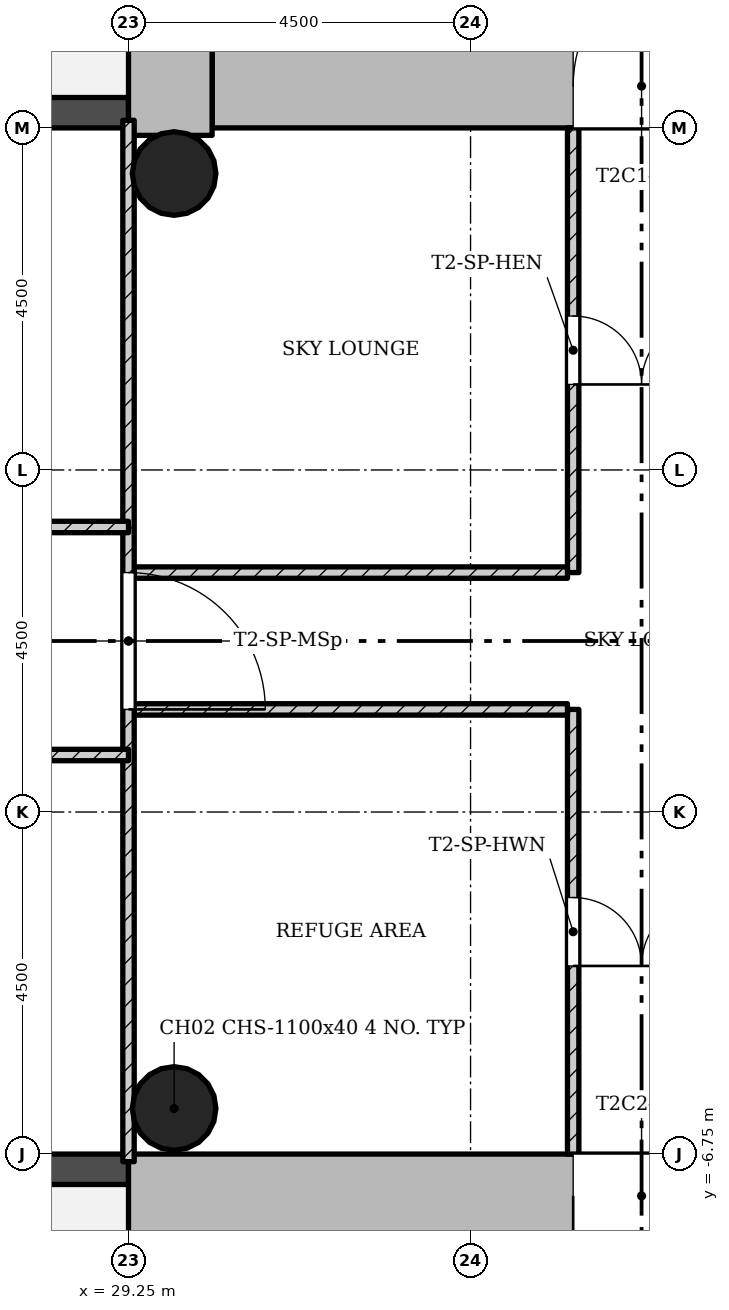
"""IFC4 building model, lengths in metres.
Left out: names, types, materials, properties, quantities, classifications, styles, units other than length and angle.
Written with IfcOpenShell. Run it as: python <this file> out.ifc"""

import sys

from ifc_helpers import new_model, si_unit, direction, frame, frame_2d, origin, origin_2d, place, context, subcontext, project, spatial, rectangle, hollow_circle, extrude, element, fill, save


model = new_model("IFC4")
c1 = context("Model", 3, precision=1e-05, world=origin(), true_north=direction((0.0, 1.0)))
c2 = subcontext(c1, "Body", "Model", "MODEL_VIEW")
j1 = project(units=[si_unit("LENGTHUNIT", "METRE"), si_unit("PLANEANGLEUNIT", "RADIAN")], contexts=[c1])
p1 = place(None, origin())
s1 = spatial("IfcSite", under=j1, at=p1, CompositionType="ELEMENT")
p2 = place(p1, origin())
s2 = spatial("IfcBuilding", under=s1, at=p2, CompositionType="ELEMENT")
p3 = place(p2, frame((0.0, 0.0, 72.1)))
s3 = spatial("IfcBuildingStorey", under=s2, at=p3, CompositionType="ELEMENT", Elevation=72.1)
p4 = place(p3, frame((30.35, 7.3, 0.0), z_axis=(0.0, 0.0, 1.0), x_axis=(1.0, 0.0, 0.0)))
e1 = element("IfcWall", 1, at=p4, inside=s3, PredefinedType="SHEAR", context=c2, shape_type="SweptSolid", body=[
    extrude(rectangle(XDim=12.4, YDim=1.1, at=frame_2d((6.2, 0.0))), origin(), (0.0, 0.0, 1.0), 4.5),
])
p5 = place(p4, frame((4.75, 0.0, 0.0)))
e2 = element("IfcOpeningElement", 2, at=p5, cuts=e1, PredefinedType="OPENING", context=c2, shape_type="SweptSolid", body=[
    extrude(rectangle(XDim=1.8, YDim=2.1, at=frame_2d((0.9, 1.05))), frame((0.0, 0.56, 0.0), z_axis=(0.0, -1.0, 0.0), x_axis=(1.0, 0.0, 0.0)), (0.0, 0.0, 1.0), 1.12),
])
p6 = place(p3, frame((29.8, 15.248, 0.0), z_axis=(0.0, 0.0, 1.0), x_axis=(0.0, -1.0, 0.0)))
e3 = element("IfcWall", 3, at=p6, inside=s3, PredefinedType="SHEAR", context=c2, shape_type="SweptSolid", body=[
    extrude(rectangle(XDim=8.596, YDim=1.1, at=frame_2d((4.298, 0.0))), origin(), (0.0, 0.0, 1.0), 4.5),
])
p7 = place(p3, frame((41.65, -7.3, 0.0), z_axis=(0.0, 0.0, 1.0), x_axis=(-1.0, 0.0, 0.0)))
e4 = element("IfcWall", 4, at=p7, inside=s3, PredefinedType="SHEAR", context=c2, shape_type="SweptSolid", body=[
    extrude(rectangle(XDim=12.4, YDim=1.1, at=frame_2d((6.2, 0.0))), origin(), (0.0, 0.0, 1.0), 4.5),
])
p8 = place(p7, frame((4.75, 0.0, 0.0)))
e5 = element("IfcOpeningElement", 5, at=p8, cuts=e4, PredefinedType="OPENING", context=c2, shape_type="SweptSolid", body=[
    extrude(rectangle(XDim=1.8, YDim=2.1, at=frame_2d((0.9, 1.05))), frame((0.0, 0.56, 0.0), z_axis=(0.0, -1.0, 0.0), x_axis=(1.0, 0.0, 0.0)), (0.0, 0.0, 1.0), 1.12),
])
for number, where, z_axis, x_axis in (
    (6, (29.85, 6.15, 0.0), (0.0, 0.0, 1.0), (1.0, 0.0, 0.0)),
    (7, (29.85, -6.15, 0.0), (0.0, 0.0, 1.0), (1.0, 0.0, 0.0)),
):
    element("IfcColumn", number, at=place(p3, frame(where, z_axis=z_axis, x_axis=x_axis)), inside=s3, PredefinedType="COLUMN", context=c2, shape_type="SweptSolid", body=[
        extrude(hollow_circle(Radius=0.55, WallThickness=0.04, at=origin_2d()), origin(), (0.0, 0.0, 1.0), 4.5),
    ])
p9 = place(p3, frame((29.25, 6.95, -0.02), z_axis=(0.0, 0.0, 1.0), x_axis=(-1.0, 0.0, 0.0)))
e8 = element("IfcWall", 8, at=p9, inside=s3, PredefinedType="STANDARD", context=c2, shape_type="SweptSolid", body=[
    extrude(rectangle(XDim=4.5, YDim=0.4, at=frame_2d((2.25, 0.0))), origin(), (0.0, 0.0, 1.0), 4.22),
])
p10 = place(p9, frame((1.35, 0.0, 0.02)))
e9 = element("IfcOpeningElement", 9, at=p10, cuts=e8, PredefinedType="OPENING", context=c2, shape_type="SweptSolid", body=[
    extrude(rectangle(XDim=1.8, YDim=2.1, at=frame_2d((0.9, 1.05))), frame((0.0, 0.21, 0.0), z_axis=(0.0, -1.0, 0.0), x_axis=(1.0, 0.0, 0.0)), (0.0, 0.0, 1.0), 0.42),
])
p11 = place(p3, frame((24.75, -6.95, -0.02), z_axis=(0.0, 0.0, 1.0), x_axis=(1.0, 0.0, 0.0)))
e10 = element("IfcWall", 10, at=p11, inside=s3, PredefinedType="STANDARD", context=c2, shape_type="SweptSolid", body=[
    extrude(rectangle(XDim=4.5, YDim=0.4, at=frame_2d((2.25, 0.0))), origin(), (0.0, 0.0, 1.0), 4.22),
])
p12 = place(p11, frame((1.35, 0.0, 0.02)))
e11 = element("IfcOpeningElement", 11, at=p12, cuts=e10, PredefinedType="OPENING", context=c2, shape_type="SweptSolid", body=[
    extrude(rectangle(XDim=1.8, YDim=2.1, at=frame_2d((0.9, 1.05))), frame((0.0, 0.21, 0.0), z_axis=(0.0, -1.0, 0.0), x_axis=(1.0, 0.0, 0.0)), (0.0, 0.0, 1.0), 0.42),
])
p13 = place(p3, frame((35.1, 0.9, 0.0), z_axis=(0.0, 0.0, 1.0), x_axis=(0.0, 1.0, 0.0)))
e12 = element("IfcWall", 12, at=p13, inside=s3, PredefinedType="PARTITIONING", context=c2, shape_type="SweptSolid", body=[
    extrude(rectangle(XDim=5.85, YDim=0.15, at=frame_2d((2.925, 0.0))), origin(), (0.0, 0.0, 1.0), 4.08),
])
p14 = place(p13, frame((2.475, 0.0, 0.0)))
e13 = element("IfcOpeningElement", 13, at=p14, cuts=e12, PredefinedType="OPENING", context=c2, shape_type="SweptSolid", body=[
    extrude(rectangle(XDim=0.9, YDim=2.1, at=frame_2d((0.45, 1.05))), frame((0.0, 0.085, 0.0), z_axis=(0.0, -1.0, 0.0), x_axis=(1.0, 0.0, 0.0)), (0.0, 0.0, 1.0), 0.17),
])
p15 = place(p3, frame((35.025, 0.9, 0.0), z_axis=(0.0, 0.0, 1.0), x_axis=(-1.0, 0.0, 0.0)))
e14 = element("IfcWall", 14, at=p15, inside=s3, PredefinedType="PARTITIONING", context=c2, shape_type="SweptSolid", body=[
    extrude(rectangle(XDim=5.7, YDim=0.15, at=frame_2d((2.85, 0.0))), origin(), (0.0, 0.0, 1.0), 4.08),
])
p16 = place(p3, frame((35.1, -6.75, 0.0), z_axis=(0.0, 0.0, 1.0), x_axis=(0.0, 1.0, 0.0)))
e15 = element("IfcWall", 15, at=p16, inside=s3, PredefinedType="PARTITIONING", context=c2, shape_type="SweptSolid", body=[
    extrude(rectangle(XDim=5.85, YDim=0.15, at=frame_2d((2.925, 0.0))), origin(), (0.0, 0.0, 1.0), 4.08),
])
p17 = place(p16, frame((2.475, 0.0, 0.0)))
e16 = element("IfcOpeningElement", 16, at=p17, cuts=e15, PredefinedType="OPENING", context=c2, shape_type="SweptSolid", body=[
    extrude(rectangle(XDim=0.9, YDim=2.1, at=frame_2d((0.45, 1.05))), frame((0.0, 0.085, 0.0), z_axis=(0.0, -1.0, 0.0), x_axis=(1.0, 0.0, 0.0)), (0.0, 0.0, 1.0), 0.17),
])
p18 = place(p3, frame((35.025, -0.9, 0.0), z_axis=(0.0, 0.0, 1.0), x_axis=(-1.0, 0.0, 0.0)))
e17 = element("IfcWall", 17, at=p18, inside=s3, PredefinedType="PARTITIONING", context=c2, shape_type="SweptSolid", body=[
    extrude(rectangle(XDim=5.7, YDim=0.15, at=frame_2d((2.85, 0.0))), origin(), (0.0, 0.0, 1.0), 4.08),
])
p19 = place(p3, frame((29.25, -6.85, 0.0), z_axis=(0.0, 0.0, 1.0), x_axis=(0.0, 1.0, 0.0)))
e18 = element("IfcWall", 18, at=p19, inside=s3, PredefinedType="PARTITIONING", context=c2, shape_type="SweptSolid", body=[
    extrude(rectangle(XDim=13.7, YDim=0.15, at=frame_2d((6.85, 0.0))), origin(), (0.0, 0.0, 1.0), 4.08),
])
p20 = place(p19, frame((5.95, 0.0, 0.0)))
e19 = element("IfcOpeningElement", 19, at=p20, cuts=e18, PredefinedType="OPENING", context=c2, shape_type="SweptSolid", body=[
    extrude(rectangle(XDim=1.8, YDim=2.1, at=frame_2d((0.9, 1.05))), frame((0.0, 0.085, 0.0), z_axis=(0.0, -1.0, 0.0), x_axis=(1.0, 0.0, 0.0)), (0.0, 0.0, 1.0), 0.17),
])
p21 = place(p3, frame((29.25, 1.5, 0.0), z_axis=(0.0, 0.0, 1.0), x_axis=(-1.0, 0.0, 0.0)))
e20 = element("IfcWall", 20, at=p21, inside=s3, PredefinedType="PARTITIONING", context=c2, shape_type="SweptSolid", body=[
    extrude(rectangle(XDim=13.6, YDim=0.15, at=frame_2d((6.8, 0.0))), origin(), (0.0, 0.0, 1.0), 4.08),
])
p22 = place(p21, frame((1.8, 0.0, 0.0)))
e21 = element("IfcOpeningElement", 21, at=p22, cuts=e20, PredefinedType="OPENING", context=c2, shape_type="SweptSolid", body=[
    extrude(rectangle(XDim=0.9, YDim=2.1, at=frame_2d((0.45, 1.05))), frame((0.0, 0.085, 0.0), z_axis=(0.0, -1.0, 0.0), x_axis=(1.0, 0.0, 0.0)), (0.0, 0.0, 1.0), 0.17),
])
p23 = place(p21, frame((6.3, 0.0, 0.0)))
e22 = element("IfcOpeningElement", 22, at=p23, cuts=e20, PredefinedType="OPENING", context=c2, shape_type="SweptSolid", body=[
    extrude(rectangle(XDim=0.9, YDim=2.1, at=frame_2d((0.45, 1.05))), frame((0.0, 0.085, 0.0), z_axis=(0.0, -1.0, 0.0), x_axis=(1.0, 0.0, 0.0)), (0.0, 0.0, 1.0), 0.17),
])
p24 = place(p21, frame((10.8, 0.0, 0.0)))
e23 = element("IfcOpeningElement", 23, at=p24, cuts=e20, PredefinedType="OPENING", context=c2, shape_type="SweptSolid", body=[
    extrude(rectangle(XDim=0.9, YDim=2.1, at=frame_2d((0.45, 1.05))), frame((0.0, 0.085, 0.0), z_axis=(0.0, -1.0, 0.0), x_axis=(1.0, 0.0, 0.0)), (0.0, 0.0, 1.0), 0.17),
])
p25 = place(p3, frame((29.25, -1.5, 0.0), z_axis=(0.0, 0.0, 1.0), x_axis=(-1.0, 0.0, 0.0)))
e24 = element("IfcWall", 24, at=p25, inside=s3, PredefinedType="PARTITIONING", context=c2, shape_type="SweptSolid", body=[
    extrude(rectangle(XDim=13.6, YDim=0.15, at=frame_2d((6.8, 0.0))), origin(), (0.0, 0.0, 1.0), 4.08),
])
p26 = place(p25, frame((1.8, 0.0, 0.0)))
e25 = element("IfcOpeningElement", 25, at=p26, cuts=e24, PredefinedType="OPENING", context=c2, shape_type="SweptSolid", body=[
    extrude(rectangle(XDim=0.9, YDim=2.1, at=frame_2d((0.45, 1.05))), frame((0.0, 0.085, 0.0), z_axis=(0.0, -1.0, 0.0), x_axis=(1.0, 0.0, 0.0)), (0.0, 0.0, 1.0), 0.17),
])
p27 = place(p25, frame((6.3, 0.0, 0.0)))
e26 = element("IfcOpeningElement", 26, at=p27, cuts=e24, PredefinedType="OPENING", context=c2, shape_type="SweptSolid", body=[
    extrude(rectangle(XDim=0.9, YDim=2.1, at=frame_2d((0.45, 1.05))), frame((0.0, 0.085, 0.0), z_axis=(0.0, -1.0, 0.0), x_axis=(1.0, 0.0, 0.0)), (0.0, 0.0, 1.0), 0.17),
])
p28 = place(p25, frame((10.8, 0.0, 0.0)))
e27 = element("IfcOpeningElement", 27, at=p28, cuts=e24, PredefinedType="OPENING", context=c2, shape_type="SweptSolid", body=[
    extrude(rectangle(XDim=0.9, YDim=2.1, at=frame_2d((0.45, 1.05))), frame((0.0, 0.085, 0.0), z_axis=(0.0, -1.0, 0.0), x_axis=(1.0, 0.0, 0.0)), (0.0, 0.0, 1.0), 0.17),
])
p29 = place(p14, origin())
e28 = element("IfcDoor", 28, at=p29, inside=s3, OperationType="SINGLE_SWING_LEFT", PredefinedType="DOOR", context=c2, shape_type="SweptSolid", body=[
    extrude(rectangle(XDim=0.9, YDim=2.1, at=frame_2d((0.45, 1.05))), frame((0.0, 0.025, 0.0), z_axis=(0.0, -1.0, 0.0), x_axis=(1.0, 0.0, 0.0)), (0.0, 0.0, 1.0), 0.05),
])
fill(e13, e28)
p30 = place(p17, origin())
e29 = element("IfcDoor", 29, at=p30, inside=s3, OperationType="SINGLE_SWING_LEFT", PredefinedType="DOOR", context=c2, shape_type="SweptSolid", body=[
    extrude(rectangle(XDim=0.9, YDim=2.1, at=frame_2d((0.45, 1.05))), frame((0.0, 0.025, 0.0), z_axis=(0.0, -1.0, 0.0), x_axis=(1.0, 0.0, 0.0)), (0.0, 0.0, 1.0), 0.05),
])
fill(e16, e29)
p31 = place(p20, origin())
e30 = element("IfcDoor", 30, at=p31, inside=s3, OperationType="SINGLE_SWING_LEFT", PredefinedType="DOOR", context=c2, shape_type="SweptSolid", body=[
    extrude(rectangle(XDim=1.8, YDim=2.1, at=frame_2d((0.9, 1.05))), frame((0.0, 0.025, 0.0), z_axis=(0.0, -1.0, 0.0), x_axis=(1.0, 0.0, 0.0)), (0.0, 0.0, 1.0), 0.05),
])
fill(e19, e30)
p32 = place(p5, origin())
e31 = element("IfcDoor", 31, at=p32, inside=s3, OperationType="SINGLE_SWING_LEFT", PredefinedType="DOOR", context=c2, shape_type="SweptSolid", body=[
    extrude(rectangle(XDim=1.8, YDim=2.1, at=frame_2d((0.9, 1.05))), frame((0.0, 0.025, 0.0), z_axis=(0.0, -1.0, 0.0), x_axis=(1.0, 0.0, 0.0)), (0.0, 0.0, 1.0), 0.05),
])
fill(e2, e31)
p33 = place(p8, origin())
e32 = element("IfcDoor", 32, at=p33, inside=s3, OperationType="SINGLE_SWING_LEFT", PredefinedType="DOOR", context=c2, shape_type="SweptSolid", body=[
    extrude(rectangle(XDim=1.8, YDim=2.1, at=frame_2d((0.9, 1.05))), frame((0.0, 0.025, 0.0), z_axis=(0.0, -1.0, 0.0), x_axis=(1.0, 0.0, 0.0)), (0.0, 0.0, 1.0), 0.05),
])
fill(e5, e32)
save(model, sys.argv[1])
